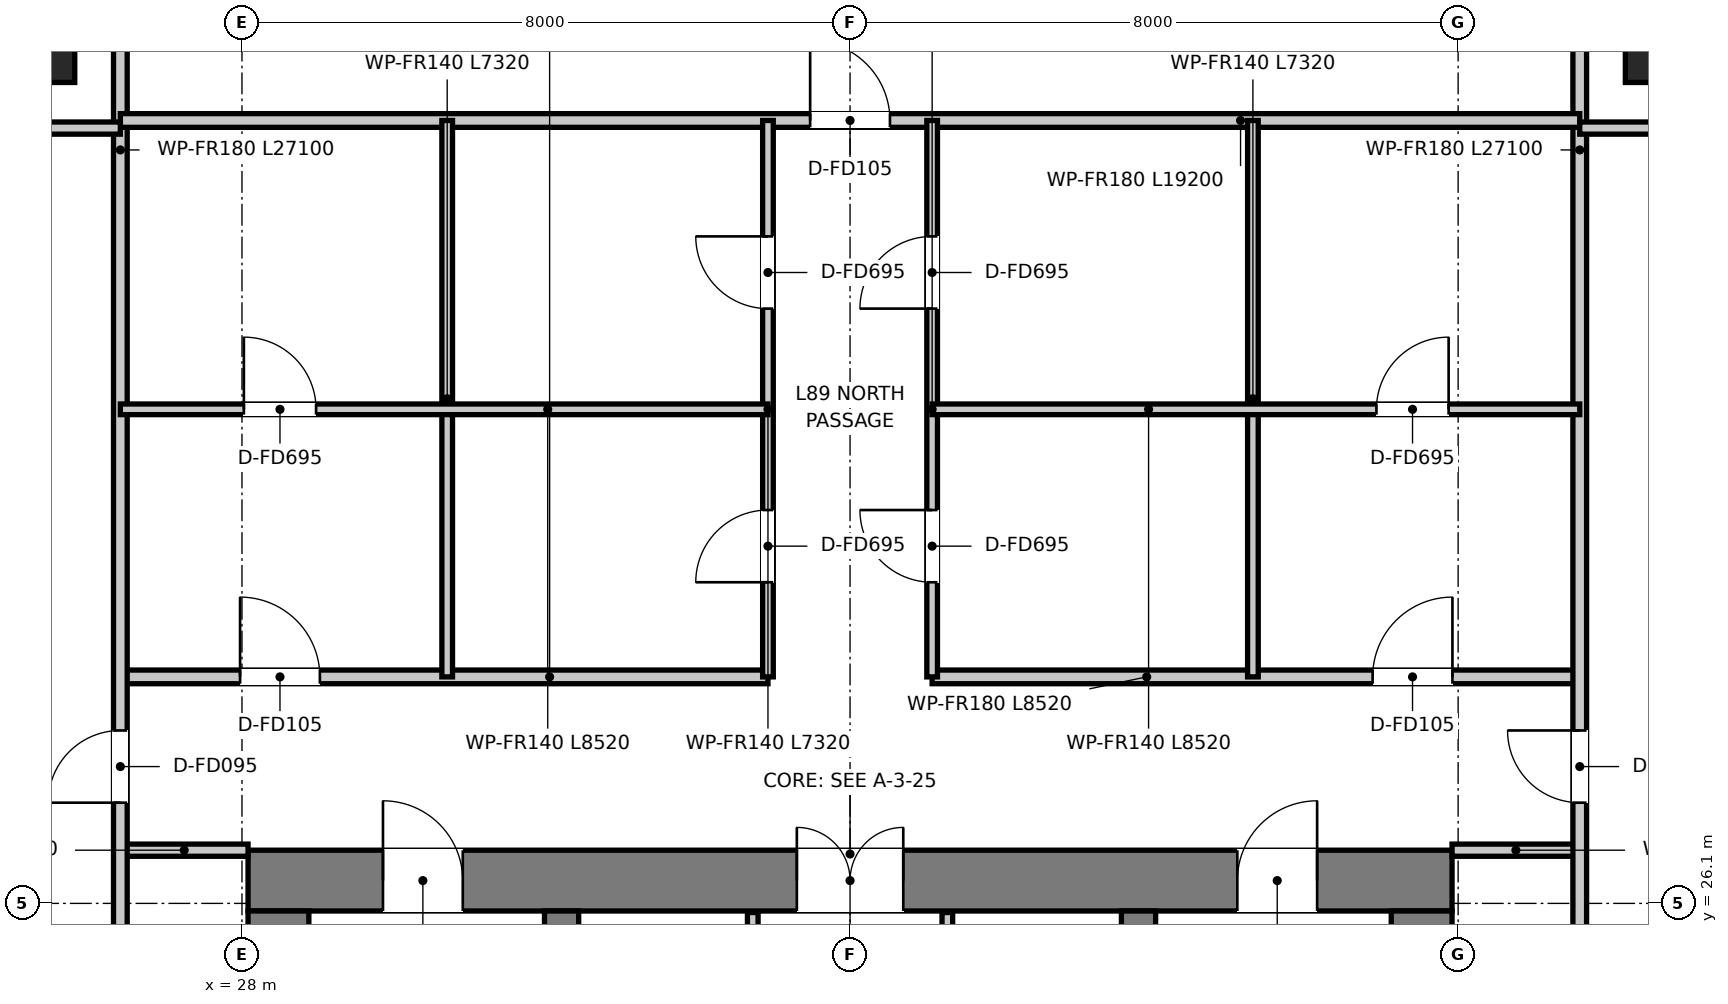
"""IFC4 building model, lengths in metres.
Left out: names, types, materials, properties, quantities, classifications, styles, units other than length and angle.
Written with IfcOpenShell. Run it as: python <this file> out.ifc"""

import sys

from ifc_helpers import new_model, si_unit, direction, frame, frame_2d, origin, origin_2d, place, context, subcontext, project, spatial, rectangle, extrude, source, transform, mapped, element, fill, save


model = new_model("IFC4")
c1 = context("Model", 3, precision=1e-05, world=origin(), true_north=direction((0.0, 1.0)))
c2 = subcontext(c1, "Body", "Model", "MODEL_VIEW")
j1 = project(units=[si_unit("LENGTHUNIT", "METRE"), si_unit("PLANEANGLEUNIT", "RADIAN")], contexts=[c1])
p1 = place(None, origin())
s1 = spatial("IfcSite", under=j1, at=p1, CompositionType="ELEMENT")
p2 = place(p1, origin())
s2 = spatial("IfcBuilding", under=s1, at=p2, CompositionType="ELEMENT")
p3 = place(p2, frame((0.0, 0.0, 363.25)))
s3 = spatial("IfcBuildingStorey", under=s2, at=p3, CompositionType="ELEMENT", Elevation=363.25)
p4 = place(p3, frame((28.08, 26.4, 0.0), z_axis=(0.0, 0.0, 1.0), x_axis=(1.0, 0.0, 0.0)))
e1 = element("IfcWall", 1, at=p4, inside=s3, PredefinedType="SHEAR", context=c2, shape_type="SweptSolid", body=[
    extrude(rectangle(XDim=15.84, YDim=0.8, at=frame_2d((7.92, 0.0))), origin(), (0.0, 0.0, 1.0), 3.8),
])
p5 = place(p4, frame((7.22, 0.0, 0.0)))
e2 = element("IfcOpeningElement", 2, at=p5, cuts=e1, PredefinedType="OPENING", context=c2, shape_type="SweptSolid", body=[
    extrude(rectangle(XDim=1.4, YDim=2.2, at=frame_2d((0.7, 1.1))), frame((0.0, 0.41, 0.0), z_axis=(0.0, -1.0, 0.0), x_axis=(1.0, 0.0, 0.0)), (0.0, 0.0, 1.0), 0.82),
])
p6 = place(p4, frame((1.775, 0.0, 0.0)))
e3 = element("IfcOpeningElement", 3, at=p6, cuts=e1, PredefinedType="OPENING", context=c2, shape_type="SweptSolid", body=[
    extrude(rectangle(XDim=1.05, YDim=2.1, at=frame_2d((0.525, 1.05))), frame((0.0, 0.41, 0.0), z_axis=(0.0, -1.0, 0.0), x_axis=(1.0, 0.0, 0.0)), (0.0, 0.0, 1.0), 0.82),
])
p7 = place(p4, frame((13.015, 0.0, 0.0)))
e4 = element("IfcOpeningElement", 4, at=p7, cuts=e1, PredefinedType="OPENING", context=c2, shape_type="SweptSolid", body=[
    extrude(rectangle(XDim=1.05, YDim=2.1, at=frame_2d((0.525, 1.05))), frame((0.0, 0.41, 0.0), z_axis=(0.0, -1.0, 0.0), x_axis=(1.0, 0.0, 0.0)), (0.0, 0.0, 1.0), 0.82),
])
for number, where, z_axis, x_axis in (
    (5, (28.48, 11.3, 0.0), (0.0, 0.0, 1.0), (0.0, 1.0, 0.0)),
    (6, (43.52, 11.3, 0.0), (0.0, 0.0, 1.0), (0.0, 1.0, 0.0)),
):
    element("IfcWall", number, at=place(p3, frame(where, z_axis=z_axis, x_axis=x_axis)), inside=s3, PredefinedType="SHEAR", context=c2, shape_type="SweptSolid", body=[
        extrude(rectangle(XDim=14.7, YDim=0.8, at=frame_2d((7.35, 0.0))), origin(), (0.0, 0.0, 1.0), 3.8),
    ])
p8 = place(p3, frame((32.205, 13.22, 0.0), z_axis=(0.0, 0.0, 1.0), x_axis=(0.0, 1.0, 0.0)))
e7 = element("IfcWall", 7, at=p8, inside=s3, PredefinedType="SHEAR", context=c2, shape_type="SweptSolid", body=[
    extrude(rectangle(XDim=12.78, YDim=0.45, at=frame_2d((6.39, 0.0))), origin(), (0.0, 0.0, 1.0), 3.8),
])
p9 = place(p8, frame((10.58, 0.0, 0.0)))
e8 = element("IfcOpeningElement", 8, at=p9, cuts=e7, PredefinedType="OPENING", context=c2, shape_type="SweptSolid", body=[
    extrude(rectangle(XDim=1.1, YDim=2.15, at=frame_2d((0.55, 1.075))), frame((0.0, 0.235, 0.0), z_axis=(0.0, -1.0, 0.0), x_axis=(1.0, 0.0, 0.0)), (0.0, 0.0, 1.0), 0.47),
])
p10 = place(p3, frame((39.795, 13.22, 0.0), z_axis=(0.0, 0.0, 1.0), x_axis=(0.0, 1.0, 0.0)))
e9 = element("IfcWall", 9, at=p10, inside=s3, PredefinedType="SHEAR", context=c2, shape_type="SweptSolid", body=[
    extrude(rectangle(XDim=12.78, YDim=0.45, at=frame_2d((6.39, 0.0))), origin(), (0.0, 0.0, 1.0), 3.8),
])
p11 = place(p10, frame((10.58, 0.0, 0.0)))
e10 = element("IfcOpeningElement", 10, at=p11, cuts=e9, PredefinedType="OPENING", context=c2, shape_type="SweptSolid", body=[
    extrude(rectangle(XDim=1.1, YDim=2.15, at=frame_2d((0.55, 1.075))), frame((0.0, 0.235, 0.0), z_axis=(0.0, -1.0, 0.0), x_axis=(1.0, 0.0, 0.0)), (0.0, 0.0, 1.0), 0.47),
])
m1 = source(origin(), c2, "Body", "SweptSolid", [
    extrude(rectangle(XDim=1.2, YDim=1.2, at=origin_2d()), origin(), (0.0, 0.0, 1.0), 3.8),
])
for number, where, z_axis, x_axis in (
    (11, (46.8, 37.5, 0.0), (0.0, 0.0, 1.0), (1.0, 0.0, 0.0)),
    (12, (25.2, 37.5, 0.0), (0.0, 0.0, 1.0), (1.0, 0.0, 0.0)),
):
    element("IfcColumn", number, at=place(p3, frame(where, z_axis=z_axis, x_axis=x_axis)), inside=s3, PredefinedType="USERDEFINED", context=c2, shape_type="MappedRepresentation", body=[
        mapped(m1, transform((0.0, 0.0, 0.0), x_axis=(1.0, 0.0, 0.0), y_axis=(0.0, 1.0, 0.0), z_axis=(0.0, 0.0, 1.0), scale=1.0)),
    ])
p12 = place(p3, frame((34.72, 20.2, 0.0), z_axis=(0.0, 0.0, 1.0), x_axis=(0.0, 1.0, 0.0)))
e13 = element("IfcWall", 13, at=p12, inside=s3, PredefinedType="PARTITIONING", context=c2, shape_type="SweptSolid", body=[
    extrude(rectangle(XDim=5.78, YDim=0.14, at=frame_2d((2.89, 0.0))), origin(), (0.0, 0.0, 1.0), 2.65),
])
p13 = place(p12, frame((1.05, 0.0, 0.0)))
e14 = element("IfcOpeningElement", 14, at=p13, cuts=e13, PredefinedType="OPENING", context=c2, shape_type="SweptSolid", body=[
    extrude(rectangle(XDim=0.9, YDim=2.1, at=frame_2d((0.45, 1.05))), frame((0.0, 0.08, 0.0), z_axis=(0.0, -1.0, 0.0), x_axis=(1.0, 0.0, 0.0)), (0.0, 0.0, 1.0), 0.16),
])
p14 = place(p3, frame((37.28, 20.2, 0.0), z_axis=(0.0, 0.0, 1.0), x_axis=(0.0, 1.0, 0.0)))
e15 = element("IfcWall", 15, at=p14, inside=s3, PredefinedType="PARTITIONING", context=c2, shape_type="SweptSolid", body=[
    extrude(rectangle(XDim=5.78, YDim=0.14, at=frame_2d((2.89, 0.0))), origin(), (0.0, 0.0, 1.0), 2.65),
])
p15 = place(p14, frame((0.95, 0.0, 0.0)))
e16 = element("IfcOpeningElement", 16, at=p15, cuts=e15, PredefinedType="OPENING", context=c2, shape_type="SweptSolid", body=[
    extrude(rectangle(XDim=1.1, YDim=2.15, at=frame_2d((0.55, 1.075))), frame((0.0, 0.08, 0.0), z_axis=(0.0, -1.0, 0.0), x_axis=(1.0, 0.0, 0.0)), (0.0, 0.0, 1.0), 0.16),
])
for number, where, z_axis, x_axis in (
    (17, (26.4, 26.8, 0.0), (0.0, 0.0, 1.0), (1.0, 0.0, 0.0)),
    (18, (43.92, 26.8, 0.0), (0.0, 0.0, 1.0), (1.0, 0.0, 0.0)),
):
    element("IfcWall", number, at=place(p3, frame(where, z_axis=z_axis, x_axis=x_axis)), inside=s3, PredefinedType="PARTITIONING", context=c2, shape_type="SweptSolid", body=[
        extrude(rectangle(XDim=1.68, YDim=0.16, at=frame_2d((0.84, 0.0))), origin(), (0.0, 0.0, 1.0), 3.5),
    ])
p16 = place(p3, frame((26.4, 29.08, 0.0), z_axis=(0.0, 0.0, 1.0), x_axis=(1.0, 0.0, 0.0)))
e19 = element("IfcWall", 19, at=p16, inside=s3, PredefinedType="PARTITIONING", context=c2, shape_type="SweptSolid", body=[
    extrude(rectangle(XDim=8.52, YDim=0.18, at=frame_2d((4.26, 0.0))), origin(), (0.0, 0.0, 1.0), 2.8),
])
p17 = place(p16, frame((1.575, 0.0, 0.0)))
e20 = element("IfcOpeningElement", 20, at=p17, cuts=e19, PredefinedType="OPENING", context=c2, shape_type="SweptSolid", body=[
    extrude(rectangle(XDim=1.05, YDim=2.1, at=frame_2d((0.525, 1.05))), frame((0.0, 0.1, 0.0), z_axis=(0.0, -1.0, 0.0), x_axis=(1.0, 0.0, 0.0)), (0.0, 0.0, 1.0), 0.2),
])
p18 = place(p3, frame((37.08, 29.08, 0.0), z_axis=(0.0, 0.0, 1.0), x_axis=(1.0, 0.0, 0.0)))
e21 = element("IfcWall", 21, at=p18, inside=s3, PredefinedType="PARTITIONING", context=c2, shape_type="SweptSolid", body=[
    extrude(rectangle(XDim=8.52, YDim=0.18, at=frame_2d((4.26, 0.0))), origin(), (0.0, 0.0, 1.0), 2.8),
])
p19 = place(p18, frame((5.795, 0.0, 0.0)))
e22 = element("IfcOpeningElement", 22, at=p19, cuts=e21, PredefinedType="OPENING", context=c2, shape_type="SweptSolid", body=[
    extrude(rectangle(XDim=1.05, YDim=2.1, at=frame_2d((0.525, 1.05))), frame((0.0, 0.1, 0.0), z_axis=(0.0, -1.0, 0.0), x_axis=(1.0, 0.0, 0.0)), (0.0, 0.0, 1.0), 0.2),
])
p20 = place(p3, frame((26.4, 16.4, 0.0), z_axis=(0.0, 0.0, 1.0), x_axis=(0.0, 1.0, 0.0)))
e23 = element("IfcWall", 23, at=p20, inside=s3, PredefinedType="PARTITIONING", context=c2, shape_type="SweptSolid", body=[
    extrude(rectangle(XDim=27.1, YDim=0.18, at=frame_2d((13.55, 0.0))), origin(), (0.0, 0.0, 1.0), 2.8),
])
p21 = place(p20, frame((11.025, 0.0, 0.0)))
e24 = element("IfcOpeningElement", 24, at=p21, cuts=e23, PredefinedType="OPENING", context=c2, shape_type="SweptSolid", body=[
    extrude(rectangle(XDim=0.95, YDim=2.1, at=frame_2d((0.475, 1.05))), frame((0.0, 0.1, 0.0), z_axis=(0.0, -1.0, 0.0), x_axis=(1.0, 0.0, 0.0)), (0.0, 0.0, 1.0), 0.2),
])
p22 = place(p3, frame((45.6, 16.4, 0.0), z_axis=(0.0, 0.0, 1.0), x_axis=(0.0, 1.0, 0.0)))
e25 = element("IfcWall", 25, at=p22, inside=s3, PredefinedType="PARTITIONING", context=c2, shape_type="SweptSolid", body=[
    extrude(rectangle(XDim=27.1, YDim=0.18, at=frame_2d((13.55, 0.0))), origin(), (0.0, 0.0, 1.0), 2.8),
])
p23 = place(p22, frame((11.025, 0.0, 0.0)))
e26 = element("IfcOpeningElement", 26, at=p23, cuts=e25, PredefinedType="OPENING", context=c2, shape_type="SweptSolid", body=[
    extrude(rectangle(XDim=0.95, YDim=2.1, at=frame_2d((0.475, 1.05))), frame((0.0, 0.1, 0.0), z_axis=(0.0, -1.0, 0.0), x_axis=(1.0, 0.0, 0.0)), (0.0, 0.0, 1.0), 0.2),
])
p24 = place(p3, frame((26.4, 36.4, 0.0), z_axis=(0.0, 0.0, 1.0), x_axis=(1.0, 0.0, 0.0)))
e27 = element("IfcWall", 27, at=p24, inside=s3, PredefinedType="PARTITIONING", context=c2, shape_type="SweptSolid", body=[
    extrude(rectangle(XDim=19.2, YDim=0.18, at=frame_2d((9.6, 0.0))), origin(), (0.0, 0.0, 1.0), 2.8),
])
p25 = place(p24, frame((9.075, 0.0, 0.0)))
e28 = element("IfcOpeningElement", 28, at=p25, cuts=e27, PredefinedType="OPENING", context=c2, shape_type="SweptSolid", body=[
    extrude(rectangle(XDim=1.05, YDim=2.1, at=frame_2d((0.525, 1.05))), frame((0.0, 0.1, 0.0), z_axis=(0.0, -1.0, 0.0), x_axis=(1.0, 0.0, 0.0)), (0.0, 0.0, 1.0), 0.2),
])
p26 = place(p3, frame((34.92, 29.08, 0.0), z_axis=(0.0, 0.0, 1.0), x_axis=(0.0, 1.0, 0.0)))
e29 = element("IfcWall", 29, at=p26, inside=s3, PredefinedType="PARTITIONING", context=c2, shape_type="SweptSolid", body=[
    extrude(rectangle(XDim=7.32, YDim=0.14, at=frame_2d((3.66, 0.0))), origin(), (0.0, 0.0, 1.0), 2.8),
])
p27 = place(p26, frame((1.245, 0.0, 0.0)))
e30 = element("IfcOpeningElement", 30, at=p27, cuts=e29, PredefinedType="OPENING", context=c2, shape_type="SweptSolid", body=[
    extrude(rectangle(XDim=0.95, YDim=2.1, at=frame_2d((0.475, 1.05))), frame((0.0, 0.08, 0.0), z_axis=(0.0, -1.0, 0.0), x_axis=(1.0, 0.0, 0.0)), (0.0, 0.0, 1.0), 0.16),
])
p28 = place(p26, frame((4.845, 0.0, 0.0)))
e31 = element("IfcOpeningElement", 31, at=p28, cuts=e29, PredefinedType="OPENING", context=c2, shape_type="SweptSolid", body=[
    extrude(rectangle(XDim=0.95, YDim=2.1, at=frame_2d((0.475, 1.05))), frame((0.0, 0.08, 0.0), z_axis=(0.0, -1.0, 0.0), x_axis=(1.0, 0.0, 0.0)), (0.0, 0.0, 1.0), 0.16),
])
p29 = place(p3, frame((37.08, 29.08, 0.0), z_axis=(0.0, 0.0, 1.0), x_axis=(0.0, 1.0, 0.0)))
e32 = element("IfcWall", 32, at=p29, inside=s3, PredefinedType="PARTITIONING", context=c2, shape_type="SweptSolid", body=[
    extrude(rectangle(XDim=7.32, YDim=0.14, at=frame_2d((3.66, 0.0))), origin(), (0.0, 0.0, 1.0), 2.8),
])
p30 = place(p29, frame((1.245, 0.0, 0.0)))
e33 = element("IfcOpeningElement", 33, at=p30, cuts=e32, PredefinedType="OPENING", context=c2, shape_type="SweptSolid", body=[
    extrude(rectangle(XDim=0.95, YDim=2.1, at=frame_2d((0.475, 1.05))), frame((0.0, 0.08, 0.0), z_axis=(0.0, -1.0, 0.0), x_axis=(1.0, 0.0, 0.0)), (0.0, 0.0, 1.0), 0.16),
])
p31 = place(p29, frame((4.845, 0.0, 0.0)))
e34 = element("IfcOpeningElement", 34, at=p31, cuts=e32, PredefinedType="OPENING", context=c2, shape_type="SweptSolid", body=[
    extrude(rectangle(XDim=0.95, YDim=2.1, at=frame_2d((0.475, 1.05))), frame((0.0, 0.08, 0.0), z_axis=(0.0, -1.0, 0.0), x_axis=(1.0, 0.0, 0.0)), (0.0, 0.0, 1.0), 0.16),
])
for number, where, z_axis, x_axis in (
    (35, (30.7, 29.08, 0.0), (0.0, 0.0, 1.0), (0.0, 1.0, 0.0)),
    (36, (41.3, 29.08, 0.0), (0.0, 0.0, 1.0), (0.0, 1.0, 0.0)),
):
    element("IfcWall", number, at=place(p3, frame(where, z_axis=z_axis, x_axis=x_axis)), inside=s3, PredefinedType="PARTITIONING", context=c2, shape_type="SweptSolid", body=[
        extrude(rectangle(XDim=7.32, YDim=0.14, at=frame_2d((3.66, 0.0))), origin(), (0.0, 0.0, 1.0), 2.8),
    ])
p32 = place(p3, frame((26.4, 32.6, 0.0), z_axis=(0.0, 0.0, 1.0), x_axis=(1.0, 0.0, 0.0)))
e37 = element("IfcWall", 37, at=p32, inside=s3, PredefinedType="PARTITIONING", context=c2, shape_type="SweptSolid", body=[
    extrude(rectangle(XDim=8.52, YDim=0.14, at=frame_2d((4.26, 0.0))), origin(), (0.0, 0.0, 1.0), 2.8),
])
p33 = place(p32, frame((1.625, 0.0, 0.0)))
e38 = element("IfcOpeningElement", 38, at=p33, cuts=e37, PredefinedType="OPENING", context=c2, shape_type="SweptSolid", body=[
    extrude(rectangle(XDim=0.95, YDim=2.1, at=frame_2d((0.475, 1.05))), frame((0.0, 0.08, 0.0), z_axis=(0.0, -1.0, 0.0), x_axis=(1.0, 0.0, 0.0)), (0.0, 0.0, 1.0), 0.16),
])
p34 = place(p3, frame((37.08, 32.6, 0.0), z_axis=(0.0, 0.0, 1.0), x_axis=(1.0, 0.0, 0.0)))
e39 = element("IfcWall", 39, at=p34, inside=s3, PredefinedType="PARTITIONING", context=c2, shape_type="SweptSolid", body=[
    extrude(rectangle(XDim=8.52, YDim=0.14, at=frame_2d((4.26, 0.0))), origin(), (0.0, 0.0, 1.0), 2.8),
])
p35 = place(p34, frame((5.845, 0.0, 0.0)))
e40 = element("IfcOpeningElement", 40, at=p35, cuts=e39, PredefinedType="OPENING", context=c2, shape_type="SweptSolid", body=[
    extrude(rectangle(XDim=0.95, YDim=2.1, at=frame_2d((0.475, 1.05))), frame((0.0, 0.08, 0.0), z_axis=(0.0, -1.0, 0.0), x_axis=(1.0, 0.0, 0.0)), (0.0, 0.0, 1.0), 0.16),
])
for number, where, z_axis, x_axis in (
    (41, (17.0, 36.3, 0.0), (0.0, 0.0, 1.0), (1.0, 0.0, 0.0)),
    (42, (45.6, 36.3, 0.0), (0.0, 0.0, 1.0), (1.0, 0.0, 0.0)),
):
    element("IfcWall", number, at=place(p3, frame(where, z_axis=z_axis, x_axis=x_axis)), inside=s3, PredefinedType="PARTITIONING", context=c2, shape_type="SweptSolid", body=[
        extrude(rectangle(XDim=9.4, YDim=0.16, at=frame_2d((4.7, 0.0))), origin(), (0.0, 0.0, 1.0), 2.8),
    ])
p36 = place(p5, origin())
e43 = element("IfcDoor", 43, at=p36, inside=s3, OperationType="DOUBLE_DOOR_SINGLE_SWING", PredefinedType="DOOR", context=c2, shape_type="SweptSolid", body=[
    extrude(rectangle(XDim=1.4, YDim=2.2, at=frame_2d((0.7, 1.1))), frame((0.0, 0.025, 0.0), z_axis=(0.0, -1.0, 0.0), x_axis=(1.0, 0.0, 0.0)), (0.0, 0.0, 1.0), 0.05),
])
fill(e2, e43)
p37 = place(p6, origin())
e44 = element("IfcDoor", 44, at=p37, inside=s3, OperationType="SINGLE_SWING_LEFT", PredefinedType="DOOR", context=c2, shape_type="SweptSolid", body=[
    extrude(rectangle(XDim=1.05, YDim=2.1, at=frame_2d((0.525, 1.05))), frame((0.0, 0.025, 0.0), z_axis=(0.0, -1.0, 0.0), x_axis=(1.0, 0.0, 0.0)), (0.0, 0.0, 1.0), 0.05),
])
fill(e3, e44)
p38 = place(p7, origin())
e45 = element("IfcDoor", 45, at=p38, inside=s3, OperationType="SINGLE_SWING_RIGHT", PredefinedType="DOOR", context=c2, shape_type="SweptSolid", body=[
    extrude(rectangle(XDim=1.05, YDim=2.1, at=frame_2d((0.525, 1.05))), frame((0.0, 0.025, 0.0), z_axis=(0.0, -1.0, 0.0), x_axis=(1.0, 0.0, 0.0)), (0.0, 0.0, 1.0), 0.05),
])
fill(e4, e45)
p39 = place(p17, origin())
e46 = element("IfcDoor", 46, at=p39, inside=s3, OperationType="SINGLE_SWING_LEFT", PredefinedType="DOOR", context=c2, shape_type="SweptSolid", body=[
    extrude(rectangle(XDim=1.05, YDim=2.1, at=frame_2d((0.525, 1.05))), frame((0.0, 0.025, 0.0), z_axis=(0.0, -1.0, 0.0), x_axis=(1.0, 0.0, 0.0)), (0.0, 0.0, 1.0), 0.05),
])
fill(e20, e46)
p40 = place(p33, origin())
e47 = element("IfcDoor", 47, at=p40, inside=s3, OperationType="SINGLE_SWING_LEFT", PredefinedType="DOOR", context=c2, shape_type="SweptSolid", body=[
    extrude(rectangle(XDim=0.95, YDim=2.1, at=frame_2d((0.475, 1.05))), frame((0.0, 0.025, 0.0), z_axis=(0.0, -1.0, 0.0), x_axis=(1.0, 0.0, 0.0)), (0.0, 0.0, 1.0), 0.05),
])
fill(e38, e47)
p41 = place(p27, origin())
e48 = element("IfcDoor", 48, at=p41, inside=s3, OperationType="SINGLE_SWING_LEFT", PredefinedType="DOOR", context=c2, shape_type="SweptSolid", body=[
    extrude(rectangle(XDim=0.95, YDim=2.1, at=frame_2d((0.475, 1.05))), frame((0.0, 0.025, 0.0), z_axis=(0.0, -1.0, 0.0), x_axis=(1.0, 0.0, 0.0)), (0.0, 0.0, 1.0), 0.05),
])
fill(e30, e48)
p42 = place(p28, origin())
e49 = element("IfcDoor", 49, at=p42, inside=s3, OperationType="SINGLE_SWING_RIGHT", PredefinedType="DOOR", context=c2, shape_type="SweptSolid", body=[
    extrude(rectangle(XDim=0.95, YDim=2.1, at=frame_2d((0.475, 1.05))), frame((0.0, 0.025, 0.0), z_axis=(0.0, -1.0, 0.0), x_axis=(1.0, 0.0, 0.0)), (0.0, 0.0, 1.0), 0.05),
])
fill(e31, e49)
p43 = place(p30, origin())
e50 = element("IfcDoor", 50, at=p43, inside=s3, OperationType="SINGLE_SWING_RIGHT", PredefinedType="DOOR", context=c2, shape_type="SweptSolid", body=[
    extrude(rectangle(XDim=0.95, YDim=2.1, at=frame_2d((0.475, 1.05))), frame((0.0, 0.025, 0.0), z_axis=(0.0, -1.0, 0.0), x_axis=(1.0, 0.0, 0.0)), (0.0, 0.0, 1.0), 0.05),
])
fill(e33, e50)
p44 = place(p31, origin())
e51 = element("IfcDoor", 51, at=p44, inside=s3, OperationType="SINGLE_SWING_LEFT", PredefinedType="DOOR", context=c2, shape_type="SweptSolid", body=[
    extrude(rectangle(XDim=0.95, YDim=2.1, at=frame_2d((0.475, 1.05))), frame((0.0, 0.025, 0.0), z_axis=(0.0, -1.0, 0.0), x_axis=(1.0, 0.0, 0.0)), (0.0, 0.0, 1.0), 0.05),
])
fill(e34, e51)
p45 = place(p19, origin())
e52 = element("IfcDoor", 52, at=p45, inside=s3, OperationType="SINGLE_SWING_RIGHT", PredefinedType="DOOR", context=c2, shape_type="SweptSolid", body=[
    extrude(rectangle(XDim=1.05, YDim=2.1, at=frame_2d((0.525, 1.05))), frame((0.0, 0.025, 0.0), z_axis=(0.0, -1.0, 0.0), x_axis=(1.0, 0.0, 0.0)), (0.0, 0.0, 1.0), 0.05),
])
fill(e22, e52)
p46 = place(p35, origin())
e53 = element("IfcDoor", 53, at=p46, inside=s3, OperationType="SINGLE_SWING_RIGHT", PredefinedType="DOOR", context=c2, shape_type="SweptSolid", body=[
    extrude(rectangle(XDim=0.95, YDim=2.1, at=frame_2d((0.475, 1.05))), frame((0.0, 0.025, 0.0), z_axis=(0.0, -1.0, 0.0), x_axis=(1.0, 0.0, 0.0)), (0.0, 0.0, 1.0), 0.05),
])
fill(e40, e53)
p47 = place(p21, origin())
e54 = element("IfcDoor", 54, at=p47, inside=s3, OperationType="SINGLE_SWING_LEFT", PredefinedType="DOOR", context=c2, shape_type="SweptSolid", body=[
    extrude(rectangle(XDim=0.95, YDim=2.1, at=frame_2d((0.475, 1.05))), frame((0.0, 0.025, 0.0), z_axis=(0.0, -1.0, 0.0), x_axis=(1.0, 0.0, 0.0)), (0.0, 0.0, 1.0), 0.05),
])
fill(e24, e54)
p48 = place(p23, origin())
e55 = element("IfcDoor", 55, at=p48, inside=s3, OperationType="SINGLE_SWING_RIGHT", PredefinedType="DOOR", context=c2, shape_type="SweptSolid", body=[
    extrude(rectangle(XDim=0.95, YDim=2.1, at=frame_2d((0.475, 1.05))), frame((0.0, 0.025, 0.0), z_axis=(0.0, -1.0, 0.0), x_axis=(1.0, 0.0, 0.0)), (0.0, 0.0, 1.0), 0.05),
])
fill(e26, e55)
p49 = place(p25, origin())
e56 = element("IfcDoor", 56, at=p49, inside=s3, OperationType="SINGLE_SWING_LEFT", PredefinedType="DOOR", context=c2, shape_type="SweptSolid", body=[
    extrude(rectangle(XDim=1.05, YDim=2.1, at=frame_2d((0.525, 1.05))), frame((0.0, 0.025, 0.0), z_axis=(0.0, -1.0, 0.0), x_axis=(1.0, 0.0, 0.0)), (0.0, 0.0, 1.0), 0.05),
])
fill(e28, e56)
save(model, sys.argv[1])
